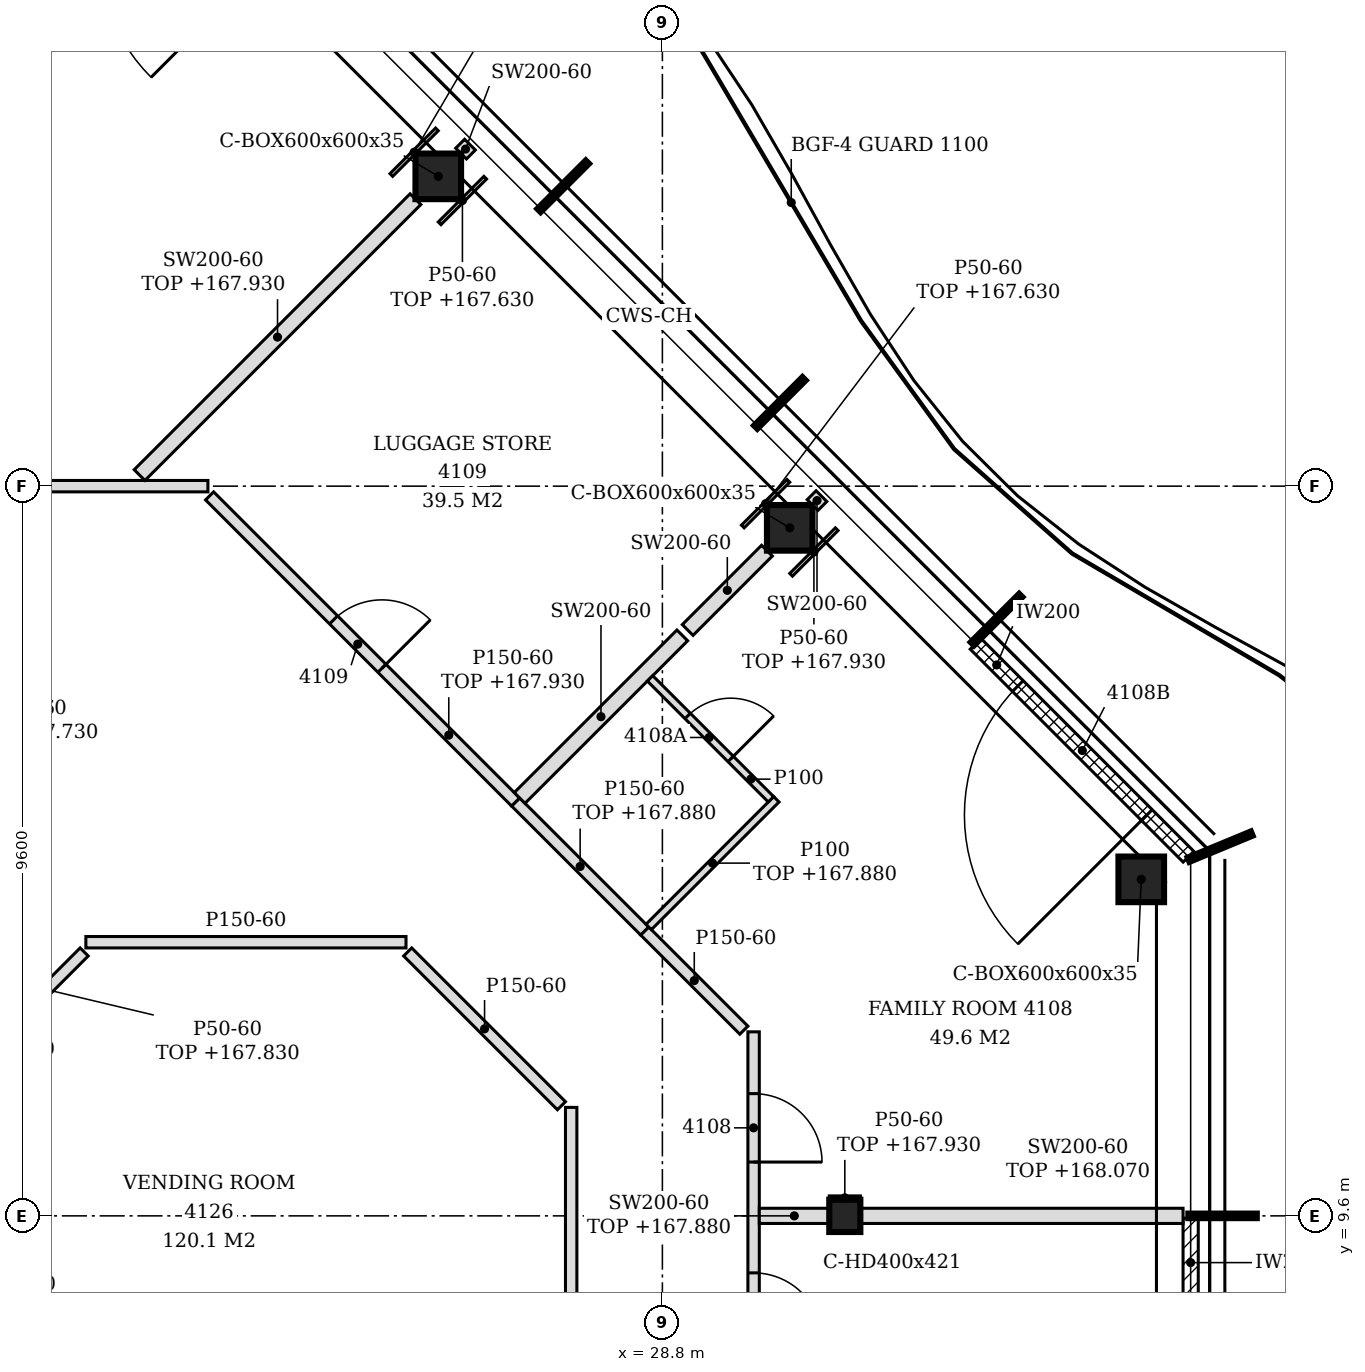
"""IFC4 building model, lengths in metres.
Left out: names, types, materials, properties, quantities, classifications, styles, units other than length and angle.
Written with IfcOpenShell. Run it as: python <this file> out.ifc"""

import sys

from ifc_helpers import new_model, si_unit, direction, frame, frame_2d, origin, origin_2d, place, context, subcontext, project, spatial, polyline, rectangle, hollow_rectangle, i_section, outline, extrude, element, fill, save


model = new_model("IFC4")
c1 = context("Model", 3, precision=1e-05, world=origin(), true_north=direction((0.0, 1.0)))
c2 = subcontext(c1, "Body", "Model", "MODEL_VIEW")
j1 = project(units=[si_unit("LENGTHUNIT", "METRE"), si_unit("PLANEANGLEUNIT", "RADIAN")], contexts=[c1])
p1 = place(None, origin())
s1 = spatial("IfcSite", under=j1, at=p1, CompositionType="ELEMENT")
p2 = place(p1, origin())
s2 = spatial("IfcBuilding", under=s1, at=p2, CompositionType="ELEMENT")
p3 = place(p2, frame((0.0, 0.0, 165.0)))
s3 = spatial("IfcBuildingStorey", under=s2, at=p3, CompositionType="ELEMENT", Elevation=165.0)
for number, where, z_axis, x_axis in (
    (1, (35.1, 14.027, -0.15), (0.0, 0.0, 1.0), (1.0, 0.0, 0.0)),
    (2, (30.476, 18.652, -0.15), (0.0, 0.0, 1.0), (1.0, 0.0, 0.0)),
    (3, (25.852, 23.276, -0.15), (0.0, 0.0, 1.0), (1.0, 0.0, 0.0)),
):
    element("IfcColumn", number, at=place(p3, frame(where, z_axis=z_axis, x_axis=x_axis)), inside=s3, PredefinedType="COLUMN", context=c2, shape_type="SweptSolid", body=[
        extrude(hollow_rectangle(XDim=0.6, YDim=0.6, WallThickness=0.035, at=origin_2d()), origin(), (0.0, 0.0, 1.0), 3.6),
    ])
p4 = place(p3, frame((31.2, 9.6, -0.15), z_axis=(0.0, 0.0, 1.0), x_axis=(1.0, 0.0, 0.0)))
e4 = element("IfcColumn", 4, at=p4, inside=s3, PredefinedType="COLUMN", context=c2, shape_type="SweptSolid", body=[
    extrude(i_section(OverallWidth=0.409, OverallDepth=0.425, WebThickness=0.033, FlangeThickness=0.052, FilletRadius=0.015, at=origin_2d()), origin(), (0.0, 0.0, 1.0), 3.6),
])
p5 = place(p3, frame((35.75, 4.83, 0.0), z_axis=(0.0, 0.0, 1.0), x_axis=(0.0, 1.0, 0.0)))
e5 = element("IfcWall", 5, at=p5, inside=s3, PredefinedType="NOTDEFINED", context=c2, shape_type="SweptSolid", body=[
    extrude(rectangle(XDim=4.74, YDim=0.2, at=frame_2d((2.37, 0.0))), origin(), (0.0, 0.0, 1.0), 3.45),
])
p6 = place(p5, frame((1.17, 0.0, 0.0)))
e6 = element("IfcOpeningElement", 6, at=p6, cuts=e5, PredefinedType="OPENING", context=c2, shape_type="SweptSolid", body=[
    extrude(rectangle(XDim=2.4, YDim=2.4, at=frame_2d((1.2, 1.2))), frame((0.0, 0.11, 0.0), z_axis=(0.0, -1.0, 0.0), x_axis=(1.0, 0.0, 0.0)), (0.0, 0.0, 1.0), 0.22),
])
p7 = place(p3, frame((35.722, 14.325, 0.0), z_axis=(0.0, 0.0, 1.0), x_axis=(-0.707106781187, 0.707106781187, 0.0)))
e7 = element("IfcWall", 7, at=p7, inside=s3, PredefinedType="NOTDEFINED", context=c2, shape_type="SweptSolid", body=[
    extrude(rectangle(XDim=3.962, YDim=0.2, at=frame_2d((1.981, 0.0))), origin(), (0.0, 0.0, 1.0), 3.45),
])
p8 = place(p7, frame((0.775, 0.0, 0.0)))
e8 = element("IfcOpeningElement", 8, at=p8, cuts=e7, PredefinedType="OPENING", context=c2, shape_type="SweptSolid", body=[
    extrude(rectangle(XDim=2.4, YDim=2.4, at=frame_2d((1.2, 1.2))), frame((0.0, 0.11, 0.0), z_axis=(0.0, -1.0, 0.0), x_axis=(1.0, 0.0, 0.0)), (0.0, 0.0, 1.0), 0.22),
])
p9 = place(p3, frame((30.0, -0.813, 0.0), z_axis=(0.0, 0.0, 1.0), x_axis=(0.0, 1.0, 0.0)))
e9 = element("IfcWall", 9, at=p9, inside=s3, PredefinedType="PARTITIONING", context=c2, shape_type="SweptSolid", body=[
    extrude(outline(polyline([(0.0, 0.0), (12.834, 0.0), (12.834, 3.45), (10.518, 3.45), (10.516, 2.88), (10.308, 2.88), (10.306, 3.45), (5.718, 3.45), (5.716, 2.88), (5.508, 2.88), (5.506, 3.45), (0.918, 3.45), (0.916, 2.88), (0.708, 2.88), (0.706, 3.45), (0.0, 3.45), (0.0, 0.0)])), frame((0.0, 0.075, 0.0), z_axis=(0.0, -1.0, 0.0), x_axis=(1.0, 0.0, 0.0)), (0.0, 0.0, 1.0), 0.15),
])
p10 = place(p9, frame((1.563, 0.0, 0.0)))
e10 = element("IfcOpeningElement", 10, at=p10, cuts=e9, PredefinedType="OPENING", context=c2, shape_type="SweptSolid", body=[
    extrude(rectangle(XDim=0.9, YDim=2.1, at=frame_2d((0.45, 1.05))), frame((0.0, 0.085, 0.0), z_axis=(0.0, -1.0, 0.0), x_axis=(1.0, 0.0, 0.0)), (0.0, 0.0, 1.0), 0.17),
])
p11 = place(p9, frame((8.763, 0.0, 0.0)))
e11 = element("IfcOpeningElement", 11, at=p11, cuts=e9, PredefinedType="OPENING", context=c2, shape_type="SweptSolid", body=[
    extrude(rectangle(XDim=0.9, YDim=2.1, at=frame_2d((0.45, 1.05))), frame((0.0, 0.085, 0.0), z_axis=(0.0, -1.0, 0.0), x_axis=(1.0, 0.0, 0.0)), (0.0, 0.0, 1.0), 0.17),
])
p12 = place(p9, frame((11.121, 0.0, 0.0)))
e12 = element("IfcOpeningElement", 12, at=p12, cuts=e9, PredefinedType="OPENING", context=c2, shape_type="SweptSolid", body=[
    extrude(rectangle(XDim=0.9, YDim=2.1, at=frame_2d((0.45, 1.05))), frame((0.0, 0.085, 0.0), z_axis=(0.0, -1.0, 0.0), x_axis=(1.0, 0.0, 0.0)), (0.0, 0.0, 1.0), 0.17),
])
p13 = place(p3, frame((27.6, 0.1, 0.0), z_axis=(0.0, 0.0, 1.0), x_axis=(0.0, 1.0, 0.0)))
e13 = element("IfcWall", 13, at=p13, inside=s3, PredefinedType="PARTITIONING", context=c2, shape_type="SweptSolid", body=[
    extrude(outline(polyline([(0.0, 0.0), (10.927, 0.0), (10.927, 3.45), (9.605, 3.45), (9.603, 2.88), (9.395, 2.88), (9.393, 3.45), (4.805, 3.45), (4.803, 2.88), (4.595, 2.88), (4.593, 3.45), (0.005, 3.45), (0.003, 2.88), (0.0, 2.88), (0.0, 0.0)])), frame((0.0, 0.075, 0.0), z_axis=(0.0, -1.0, 0.0), x_axis=(1.0, 0.0, 0.0)), (0.0, 0.0, 1.0), 0.15),
])
p14 = place(p13, frame((1.3, 0.0, 0.0)))
e14 = element("IfcOpeningElement", 14, at=p14, cuts=e13, PredefinedType="OPENING", context=c2, shape_type="SweptSolid", body=[
    extrude(rectangle(XDim=0.8, YDim=2.1, at=frame_2d((0.4, 1.05))), frame((0.0, 0.085, 0.0), z_axis=(0.0, -1.0, 0.0), x_axis=(1.0, 0.0, 0.0)), (0.0, 0.0, 1.0), 0.17),
])
p15 = place(p13, frame((4.45, 0.0, 0.0)))
e15 = element("IfcOpeningElement", 15, at=p15, cuts=e13, PredefinedType="OPENING", context=c2, shape_type="SweptSolid", body=[
    extrude(rectangle(XDim=0.8, YDim=2.1, at=frame_2d((0.4, 1.05))), frame((0.0, 0.085, 0.0), z_axis=(0.0, -1.0, 0.0), x_axis=(1.0, 0.0, 0.0)), (0.0, 0.0, 1.0), 0.17),
])
p16 = place(p3, frame((30.075, 9.6, 0.0), z_axis=(0.0, 0.0, 1.0), x_axis=(1.0, 0.0, 0.0)))
e16 = element("IfcWall", 16, at=p16, inside=s3, PredefinedType="PARTITIONING", context=c2, shape_type="SweptSolid", body=[
    extrude(rectangle(XDim=0.921, YDim=0.2, at=frame_2d((0.46, 0.0))), origin(), (0.0, 0.0, 1.0), 2.88),
])
p17 = place(p3, frame((31.405, 9.6, 0.0), z_axis=(0.0, 0.0, 1.0), x_axis=(1.0, 0.0, 0.0)))
e17 = element("IfcWall", 17, at=p17, inside=s3, PredefinedType="PARTITIONING", context=c2, shape_type="SweptSolid", body=[
    extrude(outline(polyline([(0.0, 0.0), (4.245, 0.0), (4.246, 3.07), (3.845, 3.07), (3.844, 2.93), (3.545, 2.93), (3.543, 3.07), (0.0, 3.07), (0.0, 0.0)])), frame((0.0, 0.1, 0.0), z_axis=(0.0, -1.0, 0.0), x_axis=(1.0, 0.0, 0.0)), (0.0, 0.0, 1.0), 0.2),
])
p18 = place(p3, frame((27.472, 11.049, 0.0), z_axis=(0.0, 0.0, 1.0), x_axis=(-0.707106781187, 0.707106781187, 0.0)))
e18 = element("IfcWall", 18, at=p18, inside=s3, PredefinedType="PARTITIONING", context=c2, shape_type="SweptSolid", body=[
    extrude(rectangle(XDim=2.861, YDim=0.15, at=frame_2d((1.43, 0.0))), origin(), (0.0, 0.0, 1.0), 3.45),
])
p19 = place(p3, frame((29.872, 12.043, 0.0), z_axis=(0.0, 0.0, 1.0), x_axis=(-0.707172918471, 0.707040637716, 0.0)))
e19 = element("IfcWall", 19, at=p19, inside=s3, PredefinedType="PARTITIONING", context=c2, shape_type="SweptSolid", body=[
    extrude(rectangle(XDim=1.846, YDim=0.15, at=frame_2d((0.923, 0.0))), origin(), (0.0, 0.0, 1.0), 3.45),
])
p20 = place(p3, frame((20.208, 12.086, 0.0), z_axis=(0.0, 0.0, 1.0), x_axis=(0.706756381459, 0.707457007363, 0.0)))
e20 = element("IfcWall", 20, at=p20, inside=s3, PredefinedType="PARTITIONING", context=c2, shape_type="SweptSolid", body=[
    extrude(rectangle(XDim=1.394, YDim=0.15, at=frame_2d((0.697, 0.0))), origin(), (0.0, 0.0, 1.0), 3.45),
])
p21 = place(p3, frame((21.215, 13.2, 0.0), z_axis=(0.0, 0.0, 1.0), x_axis=(1.0, 0.0, 0.0)))
e21 = element("IfcWall", 21, at=p21, inside=s3, PredefinedType="PARTITIONING", context=c2, shape_type="SweptSolid", body=[
    extrude(rectangle(XDim=4.212, YDim=0.15, at=frame_2d((2.106, 0.0))), origin(), (0.0, 0.0, 1.0), 3.45),
])
p22 = place(p3, frame((28.567, 13.348, 0.0), z_axis=(0.0, 0.0, 1.0), x_axis=(-0.707310148094, 0.706903355773, 0.0)))
e22 = element("IfcWall", 22, at=p22, inside=s3, PredefinedType="PARTITIONING", context=c2, shape_type="SweptSolid", body=[
    extrude(rectangle(XDim=2.401, YDim=0.15, at=frame_2d((1.2, 0.0))), origin(), (0.0, 0.0, 1.0), 2.88),
])
p23 = place(p3, frame((28.62, 13.401, 0.0), z_axis=(0.0, 0.0, 1.0), x_axis=(0.707055379538, 0.707158179099, 0.0)))
e23 = element("IfcWall", 23, at=p23, inside=s3, PredefinedType="PARTITIONING", context=c2, shape_type="SweptSolid", body=[
    extrude(rectangle(XDim=2.375, YDim=0.1, at=frame_2d((1.188, 0.0))), origin(), (0.0, 0.0, 1.0), 2.88),
])
p24 = place(p3, frame((26.869, 15.045, 0.0), z_axis=(0.0, 0.0, 1.0), x_axis=(-0.706999586952, 0.707213959174, 0.0)))
e24 = element("IfcWall", 24, at=p24, inside=s3, PredefinedType="PARTITIONING", context=c2, shape_type="SweptSolid", body=[
    extrude(rectangle(XDim=5.694, YDim=0.15, at=frame_2d((2.847, 0.0))), origin(), (0.0, 0.0, 1.0), 2.93),
])
p25 = place(p24, frame((2.487, 0.0, 0.0)))
e25 = element("IfcOpeningElement", 25, at=p25, cuts=e24, PredefinedType="OPENING", context=c2, shape_type="SweptSolid", body=[
    extrude(rectangle(XDim=0.9, YDim=2.1, at=frame_2d((0.45, 1.05))), frame((0.0, 0.085, 0.0), z_axis=(0.0, -1.0, 0.0), x_axis=(1.0, 0.0, 0.0)), (0.0, 0.0, 1.0), 0.17),
])
p26 = place(p3, frame((26.922, 15.098, 0.0), z_axis=(0.0, 0.0, 1.0), x_axis=(0.707268147401, 0.706945378138, 0.0)))
e26 = element("IfcWall", 26, at=p26, inside=s3, PredefinedType="PARTITIONING", context=c2, shape_type="SweptSolid", body=[
    extrude(rectangle(XDim=3.026, YDim=0.2, at=frame_2d((1.513, 0.0))), origin(), (0.0, 0.0, 1.0), 3.45),
])
p27 = place(p3, frame((30.229, 15.08, 0.0), z_axis=(0.0, 0.0, 1.0), x_axis=(-0.707052524, 0.70716103421, 0.0)))
e27 = element("IfcWall", 27, at=p27, inside=s3, PredefinedType="PARTITIONING", context=c2, shape_type="SweptSolid", body=[
    extrude(rectangle(XDim=2.25, YDim=0.1, at=frame_2d((1.125, 0.0))), origin(), (0.0, 0.0, 1.0), 3.45),
])
p28 = place(p27, frame((0.75, 0.0, 0.0)))
e28 = element("IfcOpeningElement", 28, at=p28, cuts=e27, PredefinedType="OPENING", context=c2, shape_type="SweptSolid", body=[
    extrude(rectangle(XDim=0.8, YDim=2.1, at=frame_2d((0.4, 1.05))), frame((0.0, 0.06, 0.0), z_axis=(0.0, -1.0, 0.0), x_axis=(1.0, 0.0, 0.0)), (0.0, 0.0, 1.0), 0.12),
])
p29 = place(p3, frame((29.133, 17.308, 0.0), z_axis=(0.0, 0.0, 1.0), x_axis=(0.707024044771, 0.707189507922, 0.0)))
e29 = element("IfcWall", 29, at=p29, inside=s3, PredefinedType="PARTITIONING", context=c2, shape_type="SweptSolid", body=[
    extrude(rectangle(XDim=1.476, YDim=0.2, at=frame_2d((0.738, 0.0))), origin(), (0.0, 0.0, 1.0), 3.45),
])
p30 = place(p3, frame((30.776, 18.951, 0.0), z_axis=(0.0, 0.0, 1.0), x_axis=(0.706370595651, 0.707842201059, 0.0)))
e30 = element("IfcWall", 30, at=p30, inside=s3, PredefinedType="PARTITIONING", context=c2, shape_type="SweptSolid", body=[
    extrude(rectangle(XDim=0.166, YDim=0.2, at=frame_2d((0.083, 0.0))), origin(), (0.0, 0.0, 1.0), 3.45),
])
p31 = place(p3, frame((-8.421, 19.2, 0.0), z_axis=(0.0, 0.0, 1.0), x_axis=(1.0, 0.0, 0.0)))
e31 = element("IfcWall", 31, at=p31, inside=s3, PredefinedType="PARTITIONING", context=c2, shape_type="SweptSolid", body=[
    extrude(outline(polyline([(0.0, 0.0), (31.242, 0.0), (31.242, 2.88), (27.771, 2.88), (27.769, 2.73), (27.471, 2.73), (27.469, 2.88), (15.771, 2.88), (15.769, 2.73), (15.471, 2.73), (15.469, 2.88), (3.771, 2.88), (3.769, 2.73), (3.471, 2.73), (3.469, 2.88), (0.0, 2.88), (0.0, 0.0)])), frame((0.0, 0.075, 0.0), z_axis=(0.0, -1.0, 0.0), x_axis=(1.0, 0.0, 0.0)), (0.0, 0.0, 1.0), 0.15),
])
p32 = place(p31, frame((25.997, 0.0, 0.0)))
e32 = element("IfcOpeningElement", 32, at=p32, cuts=e31, PredefinedType="OPENING", context=c2, shape_type="SweptSolid", body=[
    extrude(rectangle(XDim=0.9, YDim=2.1, at=frame_2d((0.45, 1.05))), frame((0.0, 0.085, 0.0), z_axis=(0.0, -1.0, 0.0), x_axis=(1.0, 0.0, 0.0)), (0.0, 0.0, 1.0), 0.17),
])
p33 = place(p31, frame((17.93, 0.0, 0.0)))
e33 = element("IfcOpeningElement", 33, at=p33, cuts=e31, PredefinedType="OPENING", context=c2, shape_type="SweptSolid", body=[
    extrude(rectangle(XDim=0.9, YDim=2.1, at=frame_2d((0.45, 1.05))), frame((0.0, 0.085, 0.0), z_axis=(0.0, -1.0, 0.0), x_axis=(1.0, 0.0, 0.0)), (0.0, 0.0, 1.0), 0.17),
])
p34 = place(p31, frame((14.754, 0.0, 0.0)))
e34 = element("IfcOpeningElement", 34, at=p34, cuts=e31, PredefinedType="OPENING", context=c2, shape_type="SweptSolid", body=[
    extrude(rectangle(XDim=0.9, YDim=2.1, at=frame_2d((0.45, 1.05))), frame((0.0, 0.085, 0.0), z_axis=(0.0, -1.0, 0.0), x_axis=(1.0, 0.0, 0.0)), (0.0, 0.0, 1.0), 0.17),
])
p35 = place(p31, frame((9.057, 0.0, 0.0)))
e35 = element("IfcOpeningElement", 35, at=p35, cuts=e31, PredefinedType="OPENING", context=c2, shape_type="SweptSolid", body=[
    extrude(rectangle(XDim=0.9, YDim=2.1, at=frame_2d((0.45, 1.05))), frame((0.0, 0.085, 0.0), z_axis=(0.0, -1.0, 0.0), x_axis=(1.0, 0.0, 0.0)), (0.0, 0.0, 1.0), 0.17),
])
p36 = place(p31, frame((2.907, 0.0, 0.0)))
e36 = element("IfcOpeningElement", 36, at=p36, cuts=e31, PredefinedType="OPENING", context=c2, shape_type="SweptSolid", body=[
    extrude(rectangle(XDim=0.9, YDim=2.1, at=frame_2d((0.45, 1.05))), frame((0.0, 0.085, 0.0), z_axis=(0.0, -1.0, 0.0), x_axis=(1.0, 0.0, 0.0)), (0.0, 0.0, 1.0), 0.17),
])
p37 = place(p3, frame((21.922, 19.346, 0.0), z_axis=(0.0, 0.0, 1.0), x_axis=(0.707106781187, 0.707106781187, 0.0)))
e37 = element("IfcWall", 37, at=p37, inside=s3, PredefinedType="PARTITIONING", context=c2, shape_type="SweptSolid", body=[
    extrude(rectangle(XDim=5.134, YDim=0.2, at=frame_2d((2.567, 0.0))), origin(), (0.0, 0.0, 1.0), 2.93),
])
p38 = place(p3, frame((26.152, 23.576, 0.0), z_axis=(0.0, 0.0, 1.0), x_axis=(0.707106781187, 0.707106781187, 0.0)))
e38 = element("IfcWall", 38, at=p38, inside=s3, PredefinedType="PARTITIONING", context=c2, shape_type="SweptSolid", body=[
    extrude(rectangle(XDim=0.166, YDim=0.2, at=frame_2d((0.083, 0.0))), origin(), (0.0, 0.0, 1.0), 3.45),
])
p39 = place(p3, frame((30.996, 9.837, 0.0), z_axis=(0.0, 0.0, 1.0), x_axis=(1.0, 0.0, 0.0)))
e39 = element("IfcWall", 39, at=p39, inside=s3, PredefinedType="PARTITIONING", context=c2, shape_type="SweptSolid", body=[
    extrude(rectangle(XDim=0.409, YDim=0.05, at=frame_2d((0.205, 0.0))), origin(), (0.0, 0.0, 1.0), 2.93),
])
p40 = place(p3, frame((29.858, 18.669, 0.0), z_axis=(0.0, 0.0, 1.0), x_axis=(0.707106781187, 0.707106781187, 0.0)))
e40 = element("IfcWall", 40, at=p40, inside=s3, PredefinedType="PARTITIONING", context=c2, shape_type="SweptSolid", body=[
    extrude(rectangle(XDim=0.849, YDim=0.05, at=frame_2d((0.424, 0.0))), origin(), (0.0, 0.0, 1.0), 2.63),
])
p41 = place(p3, frame((30.493, 18.034, 0.0), z_axis=(0.0, 0.0, 1.0), x_axis=(0.707106781187, 0.707106781187, 0.0)))
e41 = element("IfcWall", 41, at=p41, inside=s3, PredefinedType="PARTITIONING", context=c2, shape_type="SweptSolid", body=[
    extrude(rectangle(XDim=0.849, YDim=0.05, at=frame_2d((0.424, 0.0))), origin(), (0.0, 0.0, 1.0), 2.93),
])
p42 = place(p3, frame((25.234, 23.293, 0.0), z_axis=(0.0, 0.0, 1.0), x_axis=(0.707106781187, 0.707106781187, 0.0)))
e42 = element("IfcWall", 42, at=p42, inside=s3, PredefinedType="PARTITIONING", context=c2, shape_type="SweptSolid", body=[
    extrude(rectangle(XDim=0.848, YDim=0.05, at=frame_2d((0.424, 0.0))), origin(), (0.0, 0.0, 1.0), 2.93),
])
p43 = place(p3, frame((25.869, 22.658, 0.0), z_axis=(0.0, 0.0, 1.0), x_axis=(0.707106781187, 0.707106781187, 0.0)))
e43 = element("IfcWall", 43, at=p43, inside=s3, PredefinedType="PARTITIONING", context=c2, shape_type="SweptSolid", body=[
    extrude(rectangle(XDim=0.849, YDim=0.05, at=frame_2d((0.424, 0.0))), origin(), (0.0, 0.0, 1.0), 2.63),
])
p44 = place(p8, origin())
e44 = element("IfcDoor", 44, at=p44, inside=s3, OperationType="SINGLE_SWING_LEFT", PredefinedType="DOOR", context=c2, shape_type="SweptSolid", body=[
    extrude(rectangle(XDim=2.4, YDim=2.4, at=frame_2d((1.2, 1.2))), frame((0.0, 0.025, 0.0), z_axis=(0.0, -1.0, 0.0), x_axis=(1.0, 0.0, 0.0)), (0.0, 0.0, 1.0), 0.05),
])
fill(e8, e44)
p45 = place(p11, frame((0.9, 0.0, 0.0), z_axis=(0.0, 0.0, 1.0), x_axis=(-1.0, 0.0, 0.0)))
e45 = element("IfcDoor", 45, at=p45, inside=s3, OperationType="SINGLE_SWING_RIGHT", PredefinedType="DOOR", context=c2, shape_type="SweptSolid", body=[
    extrude(rectangle(XDim=0.9, YDim=2.1, at=frame_2d((0.45, 1.05))), frame((0.0, 0.025, 0.0), z_axis=(0.0, -1.0, 0.0), x_axis=(1.0, 0.0, 0.0)), (0.0, 0.0, 1.0), 0.05),
])
fill(e11, e45)
p46 = place(p12, frame((0.9, 0.0, 0.0), z_axis=(0.0, 0.0, 1.0), x_axis=(-1.0, 0.0, 0.0)))
e46 = element("IfcDoor", 46, at=p46, inside=s3, OperationType="SINGLE_SWING_RIGHT", PredefinedType="DOOR", context=c2, shape_type="SweptSolid", body=[
    extrude(rectangle(XDim=0.9, YDim=2.1, at=frame_2d((0.45, 1.05))), frame((0.0, 0.025, 0.0), z_axis=(0.0, -1.0, 0.0), x_axis=(1.0, 0.0, 0.0)), (0.0, 0.0, 1.0), 0.05),
])
fill(e12, e46)
p47 = place(p28, frame((0.8, 0.0, 0.0), z_axis=(0.0, 0.0, 1.0), x_axis=(-1.0, 0.0, 0.0)))
e47 = element("IfcDoor", 47, at=p47, inside=s3, OperationType="SINGLE_SWING_RIGHT", PredefinedType="DOOR", context=c2, shape_type="SweptSolid", body=[
    extrude(rectangle(XDim=0.8, YDim=2.1, at=frame_2d((0.4, 1.05))), frame((0.0, 0.025, 0.0), z_axis=(0.0, -1.0, 0.0), x_axis=(1.0, 0.0, 0.0)), (0.0, 0.0, 1.0), 0.05),
])
fill(e28, e47)
p48 = place(p25, frame((0.9, 0.0, 0.0), z_axis=(0.0, 0.0, 1.0), x_axis=(-1.0, 0.0, 0.0)))
e48 = element("IfcDoor", 48, at=p48, inside=s3, OperationType="SINGLE_SWING_RIGHT", PredefinedType="DOOR", context=c2, shape_type="SweptSolid", body=[
    extrude(rectangle(XDim=0.9, YDim=2.1, at=frame_2d((0.45, 1.05))), frame((0.0, 0.025, 0.0), z_axis=(0.0, -1.0, 0.0), x_axis=(1.0, 0.0, 0.0)), (0.0, 0.0, 1.0), 0.05),
])
fill(e25, e48)
save(model, sys.argv[1])
